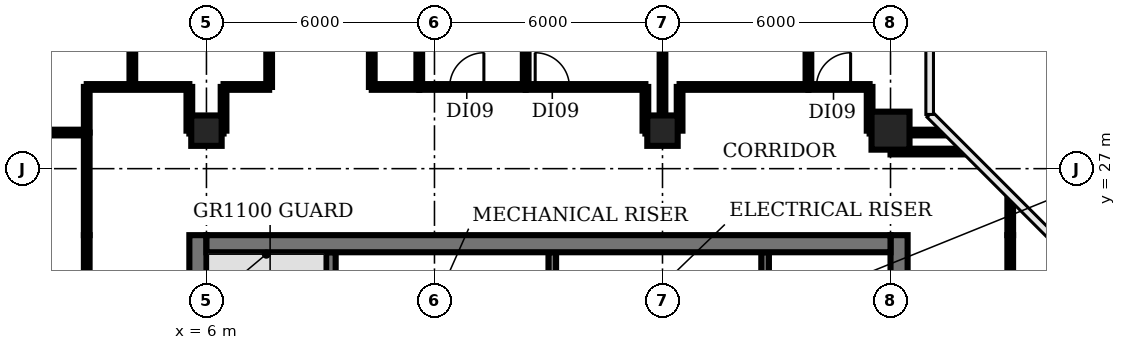
"""IFC4 building model, lengths in metres.
Left out: names, types, materials, properties, quantities, classifications, styles, units other than length and angle.
Written with IfcOpenShell. Run it as: python <this file> out.ifc"""

import sys

from ifc_helpers import new_model, si_unit, direction, frame, frame_2d, origin, origin_2d, place, context, subcontext, project, spatial, rectangle, circle, extrude, element, fill, save


model = new_model("IFC4")
c1 = context("Model", 3, precision=1e-05, world=origin(), true_north=direction((0.0, 1.0)))
c2 = subcontext(c1, "Body", "Model", "MODEL_VIEW")
j1 = project(units=[si_unit("LENGTHUNIT", "METRE"), si_unit("PLANEANGLEUNIT", "RADIAN")], contexts=[c1])
p1 = place(None, origin())
s1 = spatial("IfcSite", under=j1, at=p1, CompositionType="ELEMENT")
p2 = place(p1, origin())
s2 = spatial("IfcBuilding", under=s1, at=p2, CompositionType="ELEMENT")
p3 = place(p2, frame((0.0, 0.0, 251.6)))
s3 = spatial("IfcBuildingStorey", under=s2, at=p3, CompositionType="ELEMENT", Elevation=251.6)
for number, where, z_axis, x_axis in (
    (1, (6.0, 28.0, 0.0), (0.0, 0.0, 1.0), (1.0, 0.0, 0.0)),
    (2, (18.0, 28.0, 0.0), (0.0, 0.0, 1.0), (1.0, 0.0, 0.0)),
):
    element("IfcColumn", number, at=place(p3, frame(where, z_axis=z_axis, x_axis=x_axis)), inside=s3, PredefinedType="COLUMN", context=c2, shape_type="SweptSolid", body=[
        extrude(rectangle(XDim=0.8, YDim=0.8, at=origin_2d()), origin(), (0.0, 0.0, 1.0), 3.2),
    ])
p4 = place(p3, frame((24.0, 28.0, 0.0), z_axis=(0.0, 0.0, 1.0), x_axis=(1.0, 0.0, 0.0)))
e3 = element("IfcColumn", 3, at=p4, inside=s3, PredefinedType="COLUMN", context=c2, shape_type="SweptSolid", body=[
    extrude(circle(Radius=0.5, at=origin_2d()), origin(), (0.0, 0.0, 1.0), 3.2),
])
p5 = place(p3, frame((9.275, 18.375, 0.0), z_axis=(0.0, 0.0, 1.0), x_axis=(0.0, 1.0, 0.0)))
e4 = element("IfcWall", 4, at=p5, inside=s3, PredefinedType="SHEAR", context=c2, shape_type="SweptSolid", body=[
    extrude(rectangle(XDim=6.425, YDim=0.25, at=frame_2d((3.212, 0.0))), origin(), (0.0, 0.0, 1.0), 3.8),
])
for number, where, z_axis, x_axis in (
    (5, (15.1, 22.9, 0.0), (0.0, 0.0, 1.0), (0.0, 1.0, 0.0)),
    (6, (20.7, 22.9, 0.0), (0.0, 0.0, 1.0), (0.0, 1.0, 0.0)),
):
    element("IfcWall", number, at=place(p3, frame(where, z_axis=z_axis, x_axis=x_axis)), inside=s3, PredefinedType="SHEAR", context=c2, shape_type="SweptSolid", body=[
        extrude(rectangle(XDim=1.9, YDim=0.2, at=frame_2d((0.95, 0.0))), origin(), (0.0, 0.0, 1.0), 3.8),
    ])
p6 = place(p3, frame((5.775, 4.47, 0.0), z_axis=(0.0, 0.0, 1.0), x_axis=(0.0, 1.0, 0.0)))
e7 = element("IfcWall", 7, at=p6, inside=s3, PredefinedType="SHEAR", context=c2, shape_type="SweptSolid", body=[
    extrude(rectangle(XDim=20.78, YDim=0.45, at=frame_2d((10.39, 0.0))), origin(), (0.0, 0.0, 1.0), 3.8),
])
p7 = place(p6, frame((1.18, 0.0, 0.0)))
e8 = element("IfcOpeningElement", 8, at=p7, cuts=e7, PredefinedType="OPENING", context=c2, shape_type="SweptSolid", body=[
    extrude(rectangle(XDim=1.5, YDim=2.1, at=frame_2d((0.75, 1.05))), frame((0.0, 0.235, 0.0), z_axis=(0.0, -1.0, 0.0), x_axis=(1.0, 0.0, 0.0)), (0.0, 0.0, 1.0), 0.47),
])
p8 = place(p6, frame((7.63, 0.0, 0.0)))
e9 = element("IfcOpeningElement", 9, at=p8, cuts=e7, PredefinedType="OPENING", context=c2, shape_type="SweptSolid", body=[
    extrude(rectangle(XDim=1.2, YDim=2.1, at=frame_2d((0.6, 1.05))), frame((0.0, 0.235, 0.0), z_axis=(0.0, -1.0, 0.0), x_axis=(1.0, 0.0, 0.0)), (0.0, 0.0, 1.0), 0.47),
])
p9 = place(p6, frame((14.18, 0.0, 0.0)))
e10 = element("IfcOpeningElement", 10, at=p9, cuts=e7, PredefinedType="OPENING", context=c2, shape_type="SweptSolid", body=[
    extrude(rectangle(XDim=1.2, YDim=2.1, at=frame_2d((0.6, 1.05))), frame((0.0, 0.235, 0.0), z_axis=(0.0, -1.0, 0.0), x_axis=(1.0, 0.0, 0.0)), (0.0, 0.0, 1.0), 0.47),
])
p10 = place(p3, frame((24.225, 25.25, 0.0), z_axis=(0.0, 0.0, 1.0), x_axis=(0.0, -1.0, 0.0)))
e11 = element("IfcWall", 11, at=p10, inside=s3, PredefinedType="SHEAR", context=c2, shape_type="SweptSolid", body=[
    extrude(rectangle(XDim=20.78, YDim=0.45, at=frame_2d((10.39, 0.0))), origin(), (0.0, 0.0, 1.0), 3.8),
])
p11 = place(p10, frame((18.1, 0.0, 0.0)))
e12 = element("IfcOpeningElement", 12, at=p11, cuts=e11, PredefinedType="OPENING", context=c2, shape_type="SweptSolid", body=[
    extrude(rectangle(XDim=1.5, YDim=2.1, at=frame_2d((0.75, 1.05))), frame((0.0, 0.235, 0.0), z_axis=(0.0, -1.0, 0.0), x_axis=(1.0, 0.0, 0.0)), (0.0, 0.0, 1.0), 0.47),
])
p12 = place(p10, frame((12.0, 0.0, 0.0)))
e13 = element("IfcOpeningElement", 13, at=p12, cuts=e11, PredefinedType="OPENING", context=c2, shape_type="SweptSolid", body=[
    extrude(rectangle(XDim=0.9, YDim=2.1, at=frame_2d((0.45, 1.05))), frame((0.0, 0.235, 0.0), z_axis=(0.0, -1.0, 0.0), x_axis=(1.0, 0.0, 0.0)), (0.0, 0.0, 1.0), 0.47),
])
p13 = place(p10, frame((6.0, 0.0, 0.0)))
e14 = element("IfcOpeningElement", 14, at=p13, cuts=e11, PredefinedType="OPENING", context=c2, shape_type="SweptSolid", body=[
    extrude(rectangle(XDim=2.0, YDim=2.1, at=frame_2d((1.0, 1.05))), frame((0.0, 0.235, 0.0), z_axis=(0.0, -1.0, 0.0), x_axis=(1.0, 0.0, 0.0)), (0.0, 0.0, 1.0), 0.47),
])
p14 = place(p3, frame((6.0, 25.025, 0.0), z_axis=(0.0, 0.0, 1.0), x_axis=(1.0, 0.0, 0.0)))
e15 = element("IfcWall", 15, at=p14, inside=s3, PredefinedType="SHEAR", context=c2, shape_type="SweptSolid", body=[
    extrude(rectangle(XDim=18.0, YDim=0.45, at=frame_2d((9.0, 0.0))), origin(), (0.0, 0.0, 1.0), 3.8),
])
p15 = place(p3, frame((-1.86, 27.95, 0.0), z_axis=(0.0, 0.0, 1.0), x_axis=(1.0, 0.0, 0.0)))
e16 = element("IfcWall", 16, at=p15, inside=s3, PredefinedType="PARTITIONING", context=c2, shape_type="SweptSolid", body=[
    extrude(rectangle(XDim=4.71, YDim=0.15, at=frame_2d((2.355, 0.0))), origin(), (0.0, 0.0, 1.0), 2.83),
])
p16 = place(p3, frame((2.85, 3.94, 0.0), z_axis=(0.0, 0.0, 1.0), x_axis=(0.0, 1.0, 0.0)))
e17 = element("IfcWall", 17, at=p16, inside=s3, PredefinedType="PARTITIONING", context=c2, shape_type="SweptSolid", body=[
    extrude(rectangle(XDim=21.31, YDim=0.15, at=frame_2d((10.655, 0.0))), origin(), (0.0, 0.0, 1.0), 2.83),
])
p17 = place(p16, frame((10.01, 0.0, 0.0)))
e18 = element("IfcOpeningElement", 18, at=p17, cuts=e17, PredefinedType="OPENING", context=c2, shape_type="SweptSolid", body=[
    extrude(rectangle(XDim=1.2, YDim=2.1, at=frame_2d((0.6, 1.05))), frame((0.0, 0.085, 0.0), z_axis=(0.0, -1.0, 0.0), x_axis=(1.0, 0.0, 0.0)), (0.0, 0.0, 1.0), 0.17),
])
p18 = place(p3, frame((2.85, 25.25, 0.0), z_axis=(0.0, 0.0, 1.0), x_axis=(0.0, 1.0, 0.0)))
e19 = element("IfcWall", 19, at=p18, inside=s3, PredefinedType="PARTITIONING", context=c2, shape_type="SweptSolid", body=[
    extrude(rectangle(XDim=2.7, YDim=0.15, at=frame_2d((1.35, 0.0))), origin(), (0.0, 0.0, 1.0), 2.83),
])
p19 = place(p3, frame((2.85, 27.95, 0.0), z_axis=(0.0, 0.0, 1.0), x_axis=(0.0, 1.0, 0.0)))
e20 = element("IfcWall", 20, at=p19, inside=s3, PredefinedType="PARTITIONING", context=c2, shape_type="SweptSolid", body=[
    extrude(rectangle(XDim=1.2, YDim=0.15, at=frame_2d((0.6, 0.0))), origin(), (0.0, 0.0, 1.0), 2.83),
])
p20 = place(p3, frame((2.85, 29.15, 0.0), z_axis=(0.0, 0.0, 1.0), x_axis=(1.0, 0.0, 0.0)))
e21 = element("IfcWall", 21, at=p20, inside=s3, PredefinedType="PARTITIONING", context=c2, shape_type="SweptSolid", body=[
    extrude(rectangle(XDim=2.7, YDim=0.15, at=frame_2d((1.35, 0.0))), origin(), (0.0, 0.0, 1.0), 2.83),
])
p21 = place(p3, frame((4.05, 29.15, 0.0), z_axis=(0.0, 0.0, 1.0), x_axis=(0.0, 1.0, 0.0)))
e22 = element("IfcWall", 22, at=p21, inside=s3, PredefinedType="PARTITIONING", context=c2, shape_type="SweptSolid", body=[
    extrude(rectangle(XDim=4.8, YDim=0.15, at=frame_2d((2.4, 0.0))), origin(), (0.0, 0.0, 1.0), 2.83),
])
p22 = place(p3, frame((5.55, 28.0, 0.0), z_axis=(0.0, 0.0, 1.0), x_axis=(0.0, 1.0, 0.0)))
e23 = element("IfcWall", 23, at=p22, inside=s3, PredefinedType="PARTITIONING", context=c2, shape_type="SweptSolid", body=[
    extrude(rectangle(XDim=1.15, YDim=0.15, at=frame_2d((0.575, 0.0))), origin(), (0.0, 0.0, 1.0), 2.83),
])
p23 = place(p3, frame((5.55, 28.0, 0.0), z_axis=(0.0, 0.0, 1.0), x_axis=(1.0, 0.0, 0.0)))
e24 = element("IfcWall", 24, at=p23, inside=s3, PredefinedType="PARTITIONING", context=c2, shape_type="SweptSolid", body=[
    extrude(rectangle(XDim=0.9, YDim=0.15, at=frame_2d((0.45, 0.0))), origin(), (0.0, 0.0, 1.0), 2.83),
])
p24 = place(p3, frame((6.45, 28.0, 0.0), z_axis=(0.0, 0.0, 1.0), x_axis=(0.0, 1.0, 0.0)))
e25 = element("IfcWall", 25, at=p24, inside=s3, PredefinedType="PARTITIONING", context=c2, shape_type="SweptSolid", body=[
    extrude(rectangle(XDim=1.15, YDim=0.15, at=frame_2d((0.575, 0.0))), origin(), (0.0, 0.0, 1.0), 2.83),
])
p25 = place(p3, frame((6.45, 29.15, 0.0), z_axis=(0.0, 0.0, 1.0), x_axis=(1.0, 0.0, 0.0)))
e26 = element("IfcWall", 26, at=p25, inside=s3, PredefinedType="PARTITIONING", context=c2, shape_type="SweptSolid", body=[
    extrude(rectangle(XDim=1.2, YDim=0.15, at=frame_2d((0.6, 0.0))), origin(), (0.0, 0.0, 1.0), 2.83),
])
p26 = place(p3, frame((7.65, 29.15, 0.0), z_axis=(0.0, 0.0, 1.0), x_axis=(0.0, 1.0, 0.0)))
e27 = element("IfcWall", 27, at=p26, inside=s3, PredefinedType="PARTITIONING", context=c2, shape_type="SweptSolid", body=[
    extrude(rectangle(XDim=4.8, YDim=0.15, at=frame_2d((2.4, 0.0))), origin(), (0.0, 0.0, 1.0), 2.83),
])
p27 = place(p26, frame((1.9, 0.0, 0.0)))
e28 = element("IfcOpeningElement", 28, at=p27, cuts=e27, PredefinedType="OPENING", context=c2, shape_type="SweptSolid", body=[
    extrude(rectangle(XDim=0.9, YDim=2.1, at=frame_2d((0.45, 1.05))), frame((0.0, 0.085, 0.0), z_axis=(0.0, -1.0, 0.0), x_axis=(1.0, 0.0, 0.0)), (0.0, 0.0, 1.0), 0.17),
])
p28 = place(p3, frame((10.35, 29.15, 0.0), z_axis=(0.0, 0.0, 1.0), x_axis=(0.0, 1.0, 0.0)))
e29 = element("IfcWall", 29, at=p28, inside=s3, PredefinedType="PARTITIONING", context=c2, shape_type="SweptSolid", body=[
    extrude(rectangle(XDim=4.8, YDim=0.15, at=frame_2d((2.4, 0.0))), origin(), (0.0, 0.0, 1.0), 2.83),
])
p29 = place(p3, frame((10.35, 29.15, 0.0), z_axis=(0.0, 0.0, 1.0), x_axis=(1.0, 0.0, 0.0)))
e30 = element("IfcWall", 30, at=p29, inside=s3, PredefinedType="PARTITIONING", context=c2, shape_type="SweptSolid", body=[
    extrude(rectangle(XDim=1.25, YDim=0.15, at=frame_2d((0.625, 0.0))), origin(), (0.0, 0.0, 1.0), 2.83),
])
p30 = place(p3, frame((11.6, 29.15, 0.0), z_axis=(0.0, 0.0, 1.0), x_axis=(0.0, 1.0, 0.0)))
e31 = element("IfcWall", 31, at=p30, inside=s3, PredefinedType="PARTITIONING", context=c2, shape_type="SweptSolid", body=[
    extrude(rectangle(XDim=4.6, YDim=0.15, at=frame_2d((2.3, 0.0))), origin(), (0.0, 0.0, 1.0), 2.83),
])
p31 = place(p3, frame((11.6, 29.15, 0.0), z_axis=(0.0, 0.0, 1.0), x_axis=(1.0, 0.0, 0.0)))
e32 = element("IfcWall", 32, at=p31, inside=s3, PredefinedType="PARTITIONING", context=c2, shape_type="SweptSolid", body=[
    extrude(rectangle(XDim=2.8, YDim=0.15, at=frame_2d((1.4, 0.0))), origin(), (0.0, 0.0, 1.0), 2.83),
])
p32 = place(p31, frame((0.8, 0.0, 0.0)))
e33 = element("IfcOpeningElement", 33, at=p32, cuts=e32, PredefinedType="OPENING", context=c2, shape_type="SweptSolid", body=[
    extrude(rectangle(XDim=0.9, YDim=2.1, at=frame_2d((0.45, 1.05))), frame((0.0, 0.085, 0.0), z_axis=(0.0, -1.0, 0.0), x_axis=(1.0, 0.0, 0.0)), (0.0, 0.0, 1.0), 0.17),
])
p33 = place(p3, frame((14.4, 29.15, 0.0), z_axis=(0.0, 0.0, 1.0), x_axis=(0.0, 1.0, 0.0)))
e34 = element("IfcWall", 34, at=p33, inside=s3, PredefinedType="PARTITIONING", context=c2, shape_type="SweptSolid", body=[
    extrude(rectangle(XDim=4.8, YDim=0.15, at=frame_2d((2.4, 0.0))), origin(), (0.0, 0.0, 1.0), 2.83),
])
p34 = place(p3, frame((14.4, 29.15, 0.0), z_axis=(0.0, 0.0, 1.0), x_axis=(1.0, 0.0, 0.0)))
e35 = element("IfcWall", 35, at=p34, inside=s3, PredefinedType="PARTITIONING", context=c2, shape_type="SweptSolid", body=[
    extrude(rectangle(XDim=3.15, YDim=0.15, at=frame_2d((1.575, 0.0))), origin(), (0.0, 0.0, 1.0), 2.83),
])
p35 = place(p34, frame((0.25, 0.0, 0.0)))
e36 = element("IfcOpeningElement", 36, at=p35, cuts=e35, PredefinedType="OPENING", context=c2, shape_type="SweptSolid", body=[
    extrude(rectangle(XDim=0.9, YDim=2.1, at=frame_2d((0.45, 1.05))), frame((0.0, 0.085, 0.0), z_axis=(0.0, -1.0, 0.0), x_axis=(1.0, 0.0, 0.0)), (0.0, 0.0, 1.0), 0.17),
])
p36 = place(p3, frame((17.55, 28.0, 0.0), z_axis=(0.0, 0.0, 1.0), x_axis=(0.0, 1.0, 0.0)))
e37 = element("IfcWall", 37, at=p36, inside=s3, PredefinedType="PARTITIONING", context=c2, shape_type="SweptSolid", body=[
    extrude(rectangle(XDim=1.15, YDim=0.15, at=frame_2d((0.575, 0.0))), origin(), (0.0, 0.0, 1.0), 2.83),
])
p37 = place(p3, frame((17.55, 28.0, 0.0), z_axis=(0.0, 0.0, 1.0), x_axis=(1.0, 0.0, 0.0)))
e38 = element("IfcWall", 38, at=p37, inside=s3, PredefinedType="PARTITIONING", context=c2, shape_type="SweptSolid", body=[
    extrude(rectangle(XDim=0.45, YDim=0.15, at=frame_2d((0.225, 0.0))), origin(), (0.0, 0.0, 1.0), 2.83),
])
p38 = place(p3, frame((18.0, 28.0, 0.0), z_axis=(0.0, 0.0, 1.0), x_axis=(0.0, 1.0, 0.0)))
e39 = element("IfcWall", 39, at=p38, inside=s3, PredefinedType="PARTITIONING", context=c2, shape_type="SweptSolid", body=[
    extrude(rectangle(XDim=5.95, YDim=0.15, at=frame_2d((2.975, 0.0))), origin(), (0.0, 0.0, 1.0), 2.83),
])
p39 = place(p3, frame((18.45, 28.0, 0.0), z_axis=(0.0, 0.0, 1.0), x_axis=(0.0, 1.0, 0.0)))
e40 = element("IfcWall", 40, at=p39, inside=s3, PredefinedType="PARTITIONING", context=c2, shape_type="SweptSolid", body=[
    extrude(rectangle(XDim=1.15, YDim=0.15, at=frame_2d((0.575, 0.0))), origin(), (0.0, 0.0, 1.0), 2.83),
])
p40 = place(p3, frame((18.45, 29.15, 0.0), z_axis=(0.0, 0.0, 1.0), x_axis=(1.0, 0.0, 0.0)))
e41 = element("IfcWall", 41, at=p40, inside=s3, PredefinedType="PARTITIONING", context=c2, shape_type="SweptSolid", body=[
    extrude(rectangle(XDim=3.39, YDim=0.15, at=frame_2d((1.695, 0.0))), origin(), (0.0, 0.0, 1.0), 2.83),
])
p41 = place(p3, frame((21.84, 29.15, 0.0), z_axis=(0.0, 0.0, 1.0), x_axis=(0.0, 1.0, 0.0)))
e42 = element("IfcWall", 42, at=p41, inside=s3, PredefinedType="PARTITIONING", context=c2, shape_type="SweptSolid", body=[
    extrude(rectangle(XDim=4.8, YDim=0.15, at=frame_2d((2.4, 0.0))), origin(), (0.0, 0.0, 1.0), 2.83),
])
p42 = place(p3, frame((21.84, 29.15, 0.0), z_axis=(0.0, 0.0, 1.0), x_axis=(1.0, 0.0, 0.0)))
e43 = element("IfcWall", 43, at=p42, inside=s3, PredefinedType="PARTITIONING", context=c2, shape_type="SweptSolid", body=[
    extrude(rectangle(XDim=1.61, YDim=0.15, at=frame_2d((0.805, 0.0))), origin(), (0.0, 0.0, 1.0), 2.83),
])
p43 = place(p42, frame((0.21, 0.0, 0.0)))
e44 = element("IfcOpeningElement", 44, at=p43, cuts=e43, PredefinedType="OPENING", context=c2, shape_type="SweptSolid", body=[
    extrude(rectangle(XDim=0.9, YDim=2.1, at=frame_2d((0.45, 1.05))), frame((0.0, 0.085, 0.0), z_axis=(0.0, -1.0, 0.0), x_axis=(1.0, 0.0, 0.0)), (0.0, 0.0, 1.0), 0.17),
])
p44 = place(p3, frame((23.45, 28.0, 0.0), z_axis=(0.0, 0.0, 1.0), x_axis=(0.0, 1.0, 0.0)))
e45 = element("IfcWall", 45, at=p44, inside=s3, PredefinedType="PARTITIONING", context=c2, shape_type="SweptSolid", body=[
    extrude(rectangle(XDim=1.15, YDim=0.15, at=frame_2d((0.575, 0.0))), origin(), (0.0, 0.0, 1.0), 2.83),
])
p45 = place(p3, frame((23.45, 28.0, 0.0), z_axis=(0.0, 0.0, 1.0), x_axis=(1.0, 0.0, 0.0)))
e46 = element("IfcWall", 46, at=p45, inside=s3, PredefinedType="PARTITIONING", context=c2, shape_type="SweptSolid", body=[
    extrude(rectangle(XDim=0.55, YDim=0.15, at=frame_2d((0.275, 0.0))), origin(), (0.0, 0.0, 1.0), 2.83),
])
p46 = place(p3, frame((24.0, 27.45, 0.0), z_axis=(0.0, 0.0, 1.0), x_axis=(1.0, 0.0, 0.0)))
e47 = element("IfcWall", 47, at=p46, inside=s3, PredefinedType="PARTITIONING", context=c2, shape_type="SweptSolid", body=[
    extrude(rectangle(XDim=1.94, YDim=0.15, at=frame_2d((0.97, 0.0))), origin(), (0.0, 0.0, 1.0), 2.83),
])
p47 = place(p3, frame((24.0, 27.95, 0.0), z_axis=(0.0, 0.0, 1.0), x_axis=(1.0, 0.0, 0.0)))
e48 = element("IfcWall", 48, at=p47, inside=s3, PredefinedType="PARTITIONING", context=c2, shape_type="SweptSolid", body=[
    extrude(rectangle(XDim=1.44, YDim=0.15, at=frame_2d((0.72, 0.0))), origin(), (0.0, 0.0, 1.0), 2.83),
])
p48 = place(p3, frame((27.15, 25.25, 0.0), z_axis=(0.0, 0.0, 1.0), x_axis=(0.0, -1.0, 0.0)))
e49 = element("IfcWall", 49, at=p48, inside=s3, PredefinedType="PARTITIONING", context=c2, shape_type="SweptSolid", body=[
    extrude(rectangle(XDim=10.1, YDim=0.15, at=frame_2d((5.05, 0.0))), origin(), (0.0, 0.0, 1.0), 2.83),
])
p49 = place(p48, frame((4.5, 0.0, 0.0)))
e50 = element("IfcOpeningElement", 50, at=p49, cuts=e49, PredefinedType="OPENING", context=c2, shape_type="SweptSolid", body=[
    extrude(rectangle(XDim=1.2, YDim=2.1, at=frame_2d((0.6, 1.05))), frame((0.0, 0.085, 0.0), z_axis=(0.0, -1.0, 0.0), x_axis=(1.0, 0.0, 0.0)), (0.0, 0.0, 1.0), 0.17),
])
p50 = place(p3, frame((27.15, 25.25, 0.0), z_axis=(0.0, 0.0, 1.0), x_axis=(0.0, 1.0, 0.0)))
e51 = element("IfcWall", 51, at=p50, inside=s3, PredefinedType="PARTITIONING", context=c2, shape_type="SweptSolid", body=[
    extrude(rectangle(XDim=0.98, YDim=0.15, at=frame_2d((0.49, 0.0))), origin(), (0.0, 0.0, 1.0), 2.83),
])
p51 = place(p32, origin())
e52 = element("IfcDoor", 52, at=p51, inside=s3, OperationType="SINGLE_SWING_RIGHT", PredefinedType="DOOR", context=c2, shape_type="SweptSolid", body=[
    extrude(rectangle(XDim=0.9, YDim=2.1, at=frame_2d((0.45, 1.05))), frame((0.0, 0.025, 0.0), z_axis=(0.0, -1.0, 0.0), x_axis=(1.0, 0.0, 0.0)), (0.0, 0.0, 1.0), 0.05),
])
fill(e33, e52)
p52 = place(p35, origin())
e53 = element("IfcDoor", 53, at=p52, inside=s3, OperationType="SINGLE_SWING_LEFT", PredefinedType="DOOR", context=c2, shape_type="SweptSolid", body=[
    extrude(rectangle(XDim=0.9, YDim=2.1, at=frame_2d((0.45, 1.05))), frame((0.0, 0.025, 0.0), z_axis=(0.0, -1.0, 0.0), x_axis=(1.0, 0.0, 0.0)), (0.0, 0.0, 1.0), 0.05),
])
fill(e36, e53)
p53 = place(p43, origin())
e54 = element("IfcDoor", 54, at=p53, inside=s3, OperationType="SINGLE_SWING_RIGHT", PredefinedType="DOOR", context=c2, shape_type="SweptSolid", body=[
    extrude(rectangle(XDim=0.9, YDim=2.1, at=frame_2d((0.45, 1.05))), frame((0.0, 0.025, 0.0), z_axis=(0.0, -1.0, 0.0), x_axis=(1.0, 0.0, 0.0)), (0.0, 0.0, 1.0), 0.05),
])
fill(e44, e54)
save(model, sys.argv[1])
